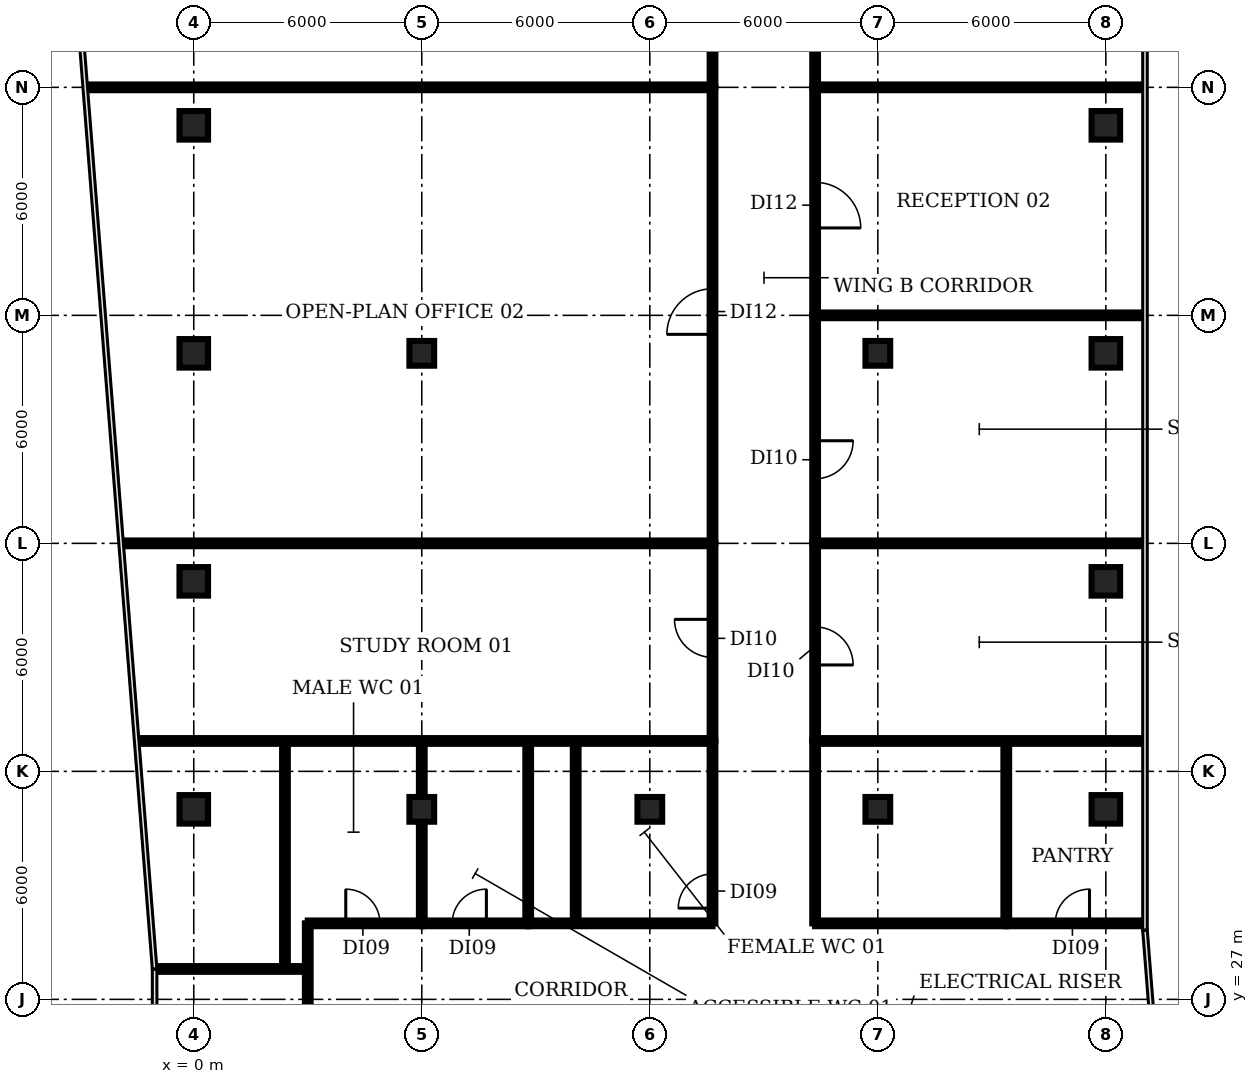
"""IFC4 building model, lengths in metres.
Left out: names, types, materials, properties, quantities, classifications, styles, units other than length and angle.
Written with IfcOpenShell. Run it as: python <this file> out.ifc"""

import sys

from ifc_helpers import new_model, si_unit, direction, frame, frame_2d, origin, origin_2d, place, context, subcontext, project, spatial, rectangle, extrude, element, fill, save


model = new_model("IFC4")
c1 = context("Model", 3, precision=1e-05, world=origin(), true_north=direction((0.0, 1.0)))
c2 = subcontext(c1, "Body", "Model", "MODEL_VIEW")
j1 = project(units=[si_unit("LENGTHUNIT", "METRE"), si_unit("PLANEANGLEUNIT", "RADIAN")], contexts=[c1])
p1 = place(None, origin())
s1 = spatial("IfcSite", under=j1, at=p1, CompositionType="ELEMENT")
p2 = place(p1, origin())
s2 = spatial("IfcBuilding", under=s1, at=p2, CompositionType="ELEMENT")
p3 = place(p2, frame((0.0, 0.0, 306.2)))
s3 = spatial("IfcBuildingStorey", under=s2, at=p3, CompositionType="ELEMENT", Elevation=306.2)
for number, where, z_axis, x_axis in (
    (1, (0.0, 32.0, 0.0), (0.0, 0.0, 1.0), (1.0, 0.0, 0.0)),
    (2, (0.0, 38.0, 0.0), (0.0, 0.0, 1.0), (1.0, 0.0, 0.0)),
    (3, (0.0, 44.0, 0.0), (0.0, 0.0, 1.0), (1.0, 0.0, 0.0)),
    (4, (0.0, 50.0, 0.0), (0.0, 0.0, 1.0), (1.0, 0.0, 0.0)),
):
    element("IfcColumn", number, at=place(p3, frame(where, z_axis=z_axis, x_axis=x_axis)), inside=s3, PredefinedType="COLUMN", context=c2, shape_type="SweptSolid", body=[
        extrude(rectangle(XDim=0.75, YDim=0.75, at=origin_2d()), origin(), (0.0, 0.0, 1.0), 3.85),
    ])
for number, where, z_axis, x_axis in (
    (5, (6.0, 32.0, 0.0), (0.0, 0.0, 1.0), (1.0, 0.0, 0.0)),
    (6, (6.0, 44.0, 0.0), (0.0, 0.0, 1.0), (1.0, 0.0, 0.0)),
    (7, (12.0, 32.0, 0.0), (0.0, 0.0, 1.0), (1.0, 0.0, 0.0)),
    (8, (18.0, 32.0, 0.0), (0.0, 0.0, 1.0), (1.0, 0.0, 0.0)),
    (9, (18.0, 44.0, 0.0), (0.0, 0.0, 1.0), (1.0, 0.0, 0.0)),
):
    element("IfcColumn", number, at=place(p3, frame(where, z_axis=z_axis, x_axis=x_axis)), inside=s3, PredefinedType="COLUMN", context=c2, shape_type="SweptSolid", body=[
        extrude(rectangle(XDim=0.65, YDim=0.65, at=origin_2d()), origin(), (0.0, 0.0, 1.0), 3.85),
    ])
for number, where, z_axis, x_axis in (
    (10, (24.0, 32.0, 0.0), (0.0, 0.0, 1.0), (1.0, 0.0, 0.0)),
    (11, (24.0, 38.0, 0.0), (0.0, 0.0, 1.0), (1.0, 0.0, 0.0)),
    (12, (24.0, 44.0, 0.0), (0.0, 0.0, 1.0), (1.0, 0.0, 0.0)),
    (13, (24.0, 50.0, 0.0), (0.0, 0.0, 1.0), (1.0, 0.0, 0.0)),
):
    element("IfcColumn", number, at=place(p3, frame(where, z_axis=z_axis, x_axis=x_axis)), inside=s3, PredefinedType="COLUMN", context=c2, shape_type="SweptSolid", body=[
        extrude(rectangle(XDim=0.75, YDim=0.75, at=origin_2d()), origin(), (0.0, 0.0, 1.0), 3.85),
    ])
p4 = place(p3, frame((-2.81, 51.0, 0.0), z_axis=(0.0, 0.0, 1.0), x_axis=(1.0, 0.0, 0.0)))
e14 = element("IfcWall", 14, at=p4, inside=s3, PredefinedType="PARTITIONING", context=c2, shape_type="SweptSolid", body=[
    extrude(rectangle(XDim=16.46, YDim=0.15, at=frame_2d((8.23, 0.0))), origin(), (0.0, 0.0, 1.0), 2.9),
])
p5 = place(p3, frame((-1.856, 39.0, 0.0), z_axis=(0.0, 0.0, 1.0), x_axis=(1.0, 0.0, 0.0)))
e15 = element("IfcWall", 15, at=p5, inside=s3, PredefinedType="PARTITIONING", context=c2, shape_type="SweptSolid", body=[
    extrude(rectangle(XDim=15.506, YDim=0.15, at=frame_2d((7.753, 0.0))), origin(), (0.0, 0.0, 1.0), 2.9),
])
p6 = place(p3, frame((-1.45, 33.8, 0.0), z_axis=(0.0, 0.0, 1.0), x_axis=(1.0, 0.0, 0.0)))
e16 = element("IfcWall", 16, at=p6, inside=s3, PredefinedType="PARTITIONING", context=c2, shape_type="SweptSolid", body=[
    extrude(rectangle(XDim=15.1, YDim=0.15, at=frame_2d((7.55, 0.0))), origin(), (0.0, 0.0, 1.0), 2.9),
])
p7 = place(p3, frame((-0.967, 27.8, 0.0), z_axis=(0.0, 0.0, 1.0), x_axis=(1.0, 0.0, 0.0)))
e17 = element("IfcWall", 17, at=p7, inside=s3, PredefinedType="PARTITIONING", context=c2, shape_type="SweptSolid", body=[
    extrude(rectangle(XDim=3.967, YDim=0.15, at=frame_2d((1.984, 0.0))), origin(), (0.0, 0.0, 1.0), 2.9),
])
p8 = place(p3, frame((2.4, 27.8, 0.0), z_axis=(0.0, 0.0, 1.0), x_axis=(0.0, 1.0, 0.0)))
e18 = element("IfcWall", 18, at=p8, inside=s3, PredefinedType="PARTITIONING", context=c2, shape_type="SweptSolid", body=[
    extrude(rectangle(XDim=6.0, YDim=0.15, at=frame_2d((3.0, 0.0))), origin(), (0.0, 0.0, 1.0), 2.9),
])
p9 = place(p3, frame((3.0, 25.1, 0.0), z_axis=(0.0, 0.0, 1.0), x_axis=(0.0, 1.0, 0.0)))
e19 = element("IfcWall", 19, at=p9, inside=s3, PredefinedType="PARTITIONING", context=c2, shape_type="SweptSolid", body=[
    extrude(rectangle(XDim=3.9, YDim=0.15, at=frame_2d((1.95, 0.0))), origin(), (0.0, 0.0, 1.0), 2.9),
])
p10 = place(p3, frame((3.0, 29.0, 0.0), z_axis=(0.0, 0.0, 1.0), x_axis=(1.0, 0.0, 0.0)))
e20 = element("IfcWall", 20, at=p10, inside=s3, PredefinedType="PARTITIONING", context=c2, shape_type="SweptSolid", body=[
    extrude(rectangle(XDim=3.0, YDim=0.15, at=frame_2d((1.5, 0.0))), origin(), (0.0, 0.0, 1.0), 2.9),
])
p11 = place(p10, frame((1.0, 0.0, 0.0)))
e21 = element("IfcOpeningElement", 21, at=p11, cuts=e20, PredefinedType="OPENING", context=c2, shape_type="SweptSolid", body=[
    extrude(rectangle(XDim=0.9, YDim=2.1, at=frame_2d((0.45, 1.05))), frame((0.0, 0.085, 0.0), z_axis=(0.0, -1.0, 0.0), x_axis=(1.0, 0.0, 0.0)), (0.0, 0.0, 1.0), 0.17),
])
p12 = place(p3, frame((6.0, 29.0, 0.0), z_axis=(0.0, 0.0, 1.0), x_axis=(0.0, 1.0, 0.0)))
e22 = element("IfcWall", 22, at=p12, inside=s3, PredefinedType="PARTITIONING", context=c2, shape_type="SweptSolid", body=[
    extrude(rectangle(XDim=4.8, YDim=0.15, at=frame_2d((2.4, 0.0))), origin(), (0.0, 0.0, 1.0), 2.9),
])
p13 = place(p3, frame((6.0, 29.0, 0.0), z_axis=(0.0, 0.0, 1.0), x_axis=(1.0, 0.0, 0.0)))
e23 = element("IfcWall", 23, at=p13, inside=s3, PredefinedType="PARTITIONING", context=c2, shape_type="SweptSolid", body=[
    extrude(rectangle(XDim=2.8, YDim=0.15, at=frame_2d((1.4, 0.0))), origin(), (0.0, 0.0, 1.0), 2.9),
])
p14 = place(p13, frame((0.8, 0.0, 0.0)))
e24 = element("IfcOpeningElement", 24, at=p14, cuts=e23, PredefinedType="OPENING", context=c2, shape_type="SweptSolid", body=[
    extrude(rectangle(XDim=0.9, YDim=2.1, at=frame_2d((0.45, 1.05))), frame((0.0, 0.085, 0.0), z_axis=(0.0, -1.0, 0.0), x_axis=(1.0, 0.0, 0.0)), (0.0, 0.0, 1.0), 0.17),
])
p15 = place(p3, frame((8.8, 29.0, 0.0), z_axis=(0.0, 0.0, 1.0), x_axis=(0.0, 1.0, 0.0)))
e25 = element("IfcWall", 25, at=p15, inside=s3, PredefinedType="PARTITIONING", context=c2, shape_type="SweptSolid", body=[
    extrude(rectangle(XDim=4.8, YDim=0.15, at=frame_2d((2.4, 0.0))), origin(), (0.0, 0.0, 1.0), 2.9),
])
p16 = place(p3, frame((8.8, 29.0, 0.0), z_axis=(0.0, 0.0, 1.0), x_axis=(1.0, 0.0, 0.0)))
e26 = element("IfcWall", 26, at=p16, inside=s3, PredefinedType="PARTITIONING", context=c2, shape_type="SweptSolid", body=[
    extrude(rectangle(XDim=4.85, YDim=0.15, at=frame_2d((2.425, 0.0))), origin(), (0.0, 0.0, 1.0), 2.9),
])
p17 = place(p3, frame((10.05, 29.0, 0.0), z_axis=(0.0, 0.0, 1.0), x_axis=(0.0, 1.0, 0.0)))
e27 = element("IfcWall", 27, at=p17, inside=s3, PredefinedType="PARTITIONING", context=c2, shape_type="SweptSolid", body=[
    extrude(rectangle(XDim=4.8, YDim=0.15, at=frame_2d((2.4, 0.0))), origin(), (0.0, 0.0, 1.0), 2.9),
])
p18 = place(p3, frame((13.65, 29.0, 0.0), z_axis=(0.0, 0.0, 1.0), x_axis=(0.0, 1.0, 0.0)))
e28 = element("IfcWall", 28, at=p18, inside=s3, PredefinedType="PARTITIONING", context=c2, shape_type="SweptSolid", body=[
    extrude(rectangle(XDim=4.8, YDim=0.15, at=frame_2d((2.4, 0.0))), origin(), (0.0, 0.0, 1.0), 2.9),
])
p19 = place(p18, frame((0.4, 0.0, 0.0)))
e29 = element("IfcOpeningElement", 29, at=p19, cuts=e28, PredefinedType="OPENING", context=c2, shape_type="SweptSolid", body=[
    extrude(rectangle(XDim=0.9, YDim=2.1, at=frame_2d((0.45, 1.05))), frame((0.0, 0.085, 0.0), z_axis=(0.0, -1.0, 0.0), x_axis=(1.0, 0.0, 0.0)), (0.0, 0.0, 1.0), 0.17),
])
p20 = place(p3, frame((13.65, 33.8, 0.0), z_axis=(0.0, 0.0, 1.0), x_axis=(0.0, 1.0, 0.0)))
e30 = element("IfcWall", 30, at=p20, inside=s3, PredefinedType="PARTITIONING", context=c2, shape_type="SweptSolid", body=[
    extrude(rectangle(XDim=5.2, YDim=0.15, at=frame_2d((2.6, 0.0))), origin(), (0.0, 0.0, 1.0), 2.9),
])
p21 = place(p20, frame((2.2, 0.0, 0.0)))
e31 = element("IfcOpeningElement", 31, at=p21, cuts=e30, PredefinedType="OPENING", context=c2, shape_type="SweptSolid", body=[
    extrude(rectangle(XDim=1.0, YDim=2.1, at=frame_2d((0.5, 1.05))), frame((0.0, 0.085, 0.0), z_axis=(0.0, -1.0, 0.0), x_axis=(1.0, 0.0, 0.0)), (0.0, 0.0, 1.0), 0.17),
])
p22 = place(p3, frame((13.65, 39.0, 0.0), z_axis=(0.0, 0.0, 1.0), x_axis=(0.0, 1.0, 0.0)))
e32 = element("IfcWall", 32, at=p22, inside=s3, PredefinedType="PARTITIONING", context=c2, shape_type="SweptSolid", body=[
    extrude(rectangle(XDim=12.0, YDim=0.15, at=frame_2d((6.0, 0.0))), origin(), (0.0, 0.0, 1.0), 2.9),
])
p23 = place(p22, frame((5.5, 0.0, 0.0)))
e33 = element("IfcOpeningElement", 33, at=p23, cuts=e32, PredefinedType="OPENING", context=c2, shape_type="SweptSolid", body=[
    extrude(rectangle(XDim=1.2, YDim=2.1, at=frame_2d((0.6, 1.05))), frame((0.0, 0.085, 0.0), z_axis=(0.0, -1.0, 0.0), x_axis=(1.0, 0.0, 0.0)), (0.0, 0.0, 1.0), 0.17),
])
p24 = place(p3, frame((13.65, 51.0, 0.0), z_axis=(0.0, 0.0, 1.0), x_axis=(0.0, 1.0, 0.0)))
e34 = element("IfcWall", 34, at=p24, inside=s3, PredefinedType="PARTITIONING", context=c2, shape_type="SweptSolid", body=[
    extrude(rectangle(XDim=6.0, YDim=0.15, at=frame_2d((3.0, 0.0))), origin(), (0.0, 0.0, 1.0), 2.9),
])
p25 = place(p24, frame((2.4, 0.0, 0.0)))
e35 = element("IfcOpeningElement", 35, at=p25, cuts=e34, PredefinedType="OPENING", context=c2, shape_type="SweptSolid", body=[
    extrude(rectangle(XDim=1.0, YDim=2.1, at=frame_2d((0.5, 1.05))), frame((0.0, 0.085, 0.0), z_axis=(0.0, -1.0, 0.0), x_axis=(1.0, 0.0, 0.0)), (0.0, 0.0, 1.0), 0.17),
])
p26 = place(p3, frame((16.35, 29.0, 0.0), z_axis=(0.0, 0.0, 1.0), x_axis=(0.0, 1.0, 0.0)))
e36 = element("IfcWall", 36, at=p26, inside=s3, PredefinedType="PARTITIONING", context=c2, shape_type="SweptSolid", body=[
    extrude(rectangle(XDim=4.8, YDim=0.15, at=frame_2d((2.4, 0.0))), origin(), (0.0, 0.0, 1.0), 2.9),
])
p27 = place(p3, frame((16.35, 29.0, 0.0), z_axis=(0.0, 0.0, 1.0), x_axis=(1.0, 0.0, 0.0)))
e37 = element("IfcWall", 37, at=p27, inside=s3, PredefinedType="PARTITIONING", context=c2, shape_type="SweptSolid", body=[
    extrude(rectangle(XDim=5.03, YDim=0.15, at=frame_2d((2.515, 0.0))), origin(), (0.0, 0.0, 1.0), 2.9),
])
p28 = place(p3, frame((16.35, 33.8, 0.0), z_axis=(0.0, 0.0, 1.0), x_axis=(1.0, 0.0, 0.0)))
e38 = element("IfcWall", 38, at=p28, inside=s3, PredefinedType="PARTITIONING", context=c2, shape_type="SweptSolid", body=[
    extrude(rectangle(XDim=8.63, YDim=0.15, at=frame_2d((4.315, 0.0))), origin(), (0.0, 0.0, 1.0), 2.9),
])
p29 = place(p3, frame((16.35, 39.0, 0.0), z_axis=(0.0, 0.0, 1.0), x_axis=(0.0, -1.0, 0.0)))
e39 = element("IfcWall", 39, at=p29, inside=s3, PredefinedType="PARTITIONING", context=c2, shape_type="SweptSolid", body=[
    extrude(rectangle(XDim=5.2, YDim=0.15, at=frame_2d((2.6, 0.0))), origin(), (0.0, 0.0, 1.0), 2.9),
])
p30 = place(p29, frame((2.2, 0.0, 0.0)))
e40 = element("IfcOpeningElement", 40, at=p30, cuts=e39, PredefinedType="OPENING", context=c2, shape_type="SweptSolid", body=[
    extrude(rectangle(XDim=1.0, YDim=2.1, at=frame_2d((0.5, 1.05))), frame((0.0, 0.085, 0.0), z_axis=(0.0, -1.0, 0.0), x_axis=(1.0, 0.0, 0.0)), (0.0, 0.0, 1.0), 0.17),
])
p31 = place(p3, frame((16.35, 39.0, 0.0), z_axis=(0.0, 0.0, 1.0), x_axis=(1.0, 0.0, 0.0)))
e41 = element("IfcWall", 41, at=p31, inside=s3, PredefinedType="PARTITIONING", context=c2, shape_type="SweptSolid", body=[
    extrude(rectangle(XDim=8.63, YDim=0.15, at=frame_2d((4.315, 0.0))), origin(), (0.0, 0.0, 1.0), 2.9),
])
p32 = place(p3, frame((16.35, 45.0, 0.0), z_axis=(0.0, 0.0, 1.0), x_axis=(0.0, -1.0, 0.0)))
e42 = element("IfcWall", 42, at=p32, inside=s3, PredefinedType="PARTITIONING", context=c2, shape_type="SweptSolid", body=[
    extrude(rectangle(XDim=6.0, YDim=0.15, at=frame_2d((3.0, 0.0))), origin(), (0.0, 0.0, 1.0), 2.9),
])
p33 = place(p32, frame((3.3, 0.0, 0.0)))
e43 = element("IfcOpeningElement", 43, at=p33, cuts=e42, PredefinedType="OPENING", context=c2, shape_type="SweptSolid", body=[
    extrude(rectangle(XDim=1.0, YDim=2.1, at=frame_2d((0.5, 1.05))), frame((0.0, 0.085, 0.0), z_axis=(0.0, -1.0, 0.0), x_axis=(1.0, 0.0, 0.0)), (0.0, 0.0, 1.0), 0.17),
])
p34 = place(p3, frame((16.35, 45.0, 0.0), z_axis=(0.0, 0.0, 1.0), x_axis=(1.0, 0.0, 0.0)))
e44 = element("IfcWall", 44, at=p34, inside=s3, PredefinedType="PARTITIONING", context=c2, shape_type="SweptSolid", body=[
    extrude(rectangle(XDim=8.63, YDim=0.15, at=frame_2d((4.315, 0.0))), origin(), (0.0, 0.0, 1.0), 2.9),
])
p35 = place(p3, frame((16.35, 51.0, 0.0), z_axis=(0.0, 0.0, 1.0), x_axis=(0.0, -1.0, 0.0)))
e45 = element("IfcWall", 45, at=p35, inside=s3, PredefinedType="PARTITIONING", context=c2, shape_type="SweptSolid", body=[
    extrude(rectangle(XDim=6.0, YDim=0.15, at=frame_2d((3.0, 0.0))), origin(), (0.0, 0.0, 1.0), 2.9),
])
p36 = place(p35, frame((2.5, 0.0, 0.0)))
e46 = element("IfcOpeningElement", 46, at=p36, cuts=e45, PredefinedType="OPENING", context=c2, shape_type="SweptSolid", body=[
    extrude(rectangle(XDim=1.2, YDim=2.1, at=frame_2d((0.6, 1.05))), frame((0.0, 0.085, 0.0), z_axis=(0.0, -1.0, 0.0), x_axis=(1.0, 0.0, 0.0)), (0.0, 0.0, 1.0), 0.17),
])
p37 = place(p3, frame((16.35, 51.0, 0.0), z_axis=(0.0, 0.0, 1.0), x_axis=(1.0, 0.0, 0.0)))
e47 = element("IfcWall", 47, at=p37, inside=s3, PredefinedType="PARTITIONING", context=c2, shape_type="SweptSolid", body=[
    extrude(rectangle(XDim=8.63, YDim=0.15, at=frame_2d((4.315, 0.0))), origin(), (0.0, 0.0, 1.0), 2.9),
])
p38 = place(p3, frame((16.35, 63.09, 0.0), z_axis=(0.0, 0.0, 1.0), x_axis=(0.0, -1.0, 0.0)))
e48 = element("IfcWall", 48, at=p38, inside=s3, PredefinedType="PARTITIONING", context=c2, shape_type="SweptSolid", body=[
    extrude(rectangle(XDim=12.09, YDim=0.15, at=frame_2d((6.045, 0.0))), origin(), (0.0, 0.0, 1.0), 2.9),
])
p39 = place(p38, frame((3.79, 0.0, 0.0)))
e49 = element("IfcOpeningElement", 49, at=p39, cuts=e48, PredefinedType="OPENING", context=c2, shape_type="SweptSolid", body=[
    extrude(rectangle(XDim=1.2, YDim=2.1, at=frame_2d((0.6, 1.05))), frame((0.0, 0.085, 0.0), z_axis=(0.0, -1.0, 0.0), x_axis=(1.0, 0.0, 0.0)), (0.0, 0.0, 1.0), 0.17),
])
p40 = place(p3, frame((21.38, 29.0, 0.0), z_axis=(0.0, 0.0, 1.0), x_axis=(0.0, 1.0, 0.0)))
e50 = element("IfcWall", 50, at=p40, inside=s3, PredefinedType="PARTITIONING", context=c2, shape_type="SweptSolid", body=[
    extrude(rectangle(XDim=4.8, YDim=0.15, at=frame_2d((2.4, 0.0))), origin(), (0.0, 0.0, 1.0), 2.9),
])
p41 = place(p3, frame((21.38, 29.0, 0.0), z_axis=(0.0, 0.0, 1.0), x_axis=(1.0, 0.0, 0.0)))
e51 = element("IfcWall", 51, at=p41, inside=s3, PredefinedType="PARTITIONING", context=c2, shape_type="SweptSolid", body=[
    extrude(rectangle(XDim=3.59, YDim=0.15, at=frame_2d((1.795, 0.0))), origin(), (0.0, 0.0, 1.0), 2.9),
])
p42 = place(p41, frame((1.29, 0.0, 0.0)))
e52 = element("IfcOpeningElement", 52, at=p42, cuts=e51, PredefinedType="OPENING", context=c2, shape_type="SweptSolid", body=[
    extrude(rectangle(XDim=0.9, YDim=2.1, at=frame_2d((0.45, 1.05))), frame((0.0, 0.085, 0.0), z_axis=(0.0, -1.0, 0.0), x_axis=(1.0, 0.0, 0.0)), (0.0, 0.0, 1.0), 0.17),
])
p43 = place(p11, origin())
e53 = element("IfcDoor", 53, at=p43, inside=s3, OperationType="SINGLE_SWING_LEFT", PredefinedType="DOOR", context=c2, shape_type="SweptSolid", body=[
    extrude(rectangle(XDim=0.9, YDim=2.1, at=frame_2d((0.45, 1.05))), frame((0.0, 0.025, 0.0), z_axis=(0.0, -1.0, 0.0), x_axis=(1.0, 0.0, 0.0)), (0.0, 0.0, 1.0), 0.05),
])
fill(e21, e53)
p44 = place(p14, origin())
e54 = element("IfcDoor", 54, at=p44, inside=s3, OperationType="SINGLE_SWING_RIGHT", PredefinedType="DOOR", context=c2, shape_type="SweptSolid", body=[
    extrude(rectangle(XDim=0.9, YDim=2.1, at=frame_2d((0.45, 1.05))), frame((0.0, 0.025, 0.0), z_axis=(0.0, -1.0, 0.0), x_axis=(1.0, 0.0, 0.0)), (0.0, 0.0, 1.0), 0.05),
])
fill(e24, e54)
p45 = place(p19, origin())
e55 = element("IfcDoor", 55, at=p45, inside=s3, OperationType="SINGLE_SWING_LEFT", PredefinedType="DOOR", context=c2, shape_type="SweptSolid", body=[
    extrude(rectangle(XDim=0.9, YDim=2.1, at=frame_2d((0.45, 1.05))), frame((0.0, 0.025, 0.0), z_axis=(0.0, -1.0, 0.0), x_axis=(1.0, 0.0, 0.0)), (0.0, 0.0, 1.0), 0.05),
])
fill(e29, e55)
p46 = place(p21, origin())
e56 = element("IfcDoor", 56, at=p46, inside=s3, OperationType="SINGLE_SWING_RIGHT", PredefinedType="DOOR", context=c2, shape_type="SweptSolid", body=[
    extrude(rectangle(XDim=1.0, YDim=2.1, at=frame_2d((0.5, 1.05))), frame((0.0, 0.025, 0.0), z_axis=(0.0, -1.0, 0.0), x_axis=(1.0, 0.0, 0.0)), (0.0, 0.0, 1.0), 0.05),
])
fill(e31, e56)
p47 = place(p23, origin())
e57 = element("IfcDoor", 57, at=p47, inside=s3, OperationType="SINGLE_SWING_LEFT", PredefinedType="DOOR", context=c2, shape_type="SweptSolid", body=[
    extrude(rectangle(XDim=1.2, YDim=2.1, at=frame_2d((0.6, 1.05))), frame((0.0, 0.025, 0.0), z_axis=(0.0, -1.0, 0.0), x_axis=(1.0, 0.0, 0.0)), (0.0, 0.0, 1.0), 0.05),
])
fill(e33, e57)
p48 = place(p30, origin())
e58 = element("IfcDoor", 58, at=p48, inside=s3, OperationType="SINGLE_SWING_RIGHT", PredefinedType="DOOR", context=c2, shape_type="SweptSolid", body=[
    extrude(rectangle(XDim=1.0, YDim=2.1, at=frame_2d((0.5, 1.05))), frame((0.0, 0.025, 0.0), z_axis=(0.0, -1.0, 0.0), x_axis=(1.0, 0.0, 0.0)), (0.0, 0.0, 1.0), 0.05),
])
fill(e40, e58)
p49 = place(p33, origin())
e59 = element("IfcDoor", 59, at=p49, inside=s3, OperationType="SINGLE_SWING_LEFT", PredefinedType="DOOR", context=c2, shape_type="SweptSolid", body=[
    extrude(rectangle(XDim=1.0, YDim=2.1, at=frame_2d((0.5, 1.05))), frame((0.0, 0.025, 0.0), z_axis=(0.0, -1.0, 0.0), x_axis=(1.0, 0.0, 0.0)), (0.0, 0.0, 1.0), 0.05),
])
fill(e43, e59)
p50 = place(p36, origin())
e60 = element("IfcDoor", 60, at=p50, inside=s3, OperationType="SINGLE_SWING_RIGHT", PredefinedType="DOOR", context=c2, shape_type="SweptSolid", body=[
    extrude(rectangle(XDim=1.2, YDim=2.1, at=frame_2d((0.6, 1.05))), frame((0.0, 0.025, 0.0), z_axis=(0.0, -1.0, 0.0), x_axis=(1.0, 0.0, 0.0)), (0.0, 0.0, 1.0), 0.05),
])
fill(e46, e60)
p51 = place(p42, origin())
e61 = element("IfcDoor", 61, at=p51, inside=s3, OperationType="SINGLE_SWING_RIGHT", PredefinedType="DOOR", context=c2, shape_type="SweptSolid", body=[
    extrude(rectangle(XDim=0.9, YDim=2.1, at=frame_2d((0.45, 1.05))), frame((0.0, 0.025, 0.0), z_axis=(0.0, -1.0, 0.0), x_axis=(1.0, 0.0, 0.0)), (0.0, 0.0, 1.0), 0.05),
])
fill(e52, e61)
save(model, sys.argv[1])
